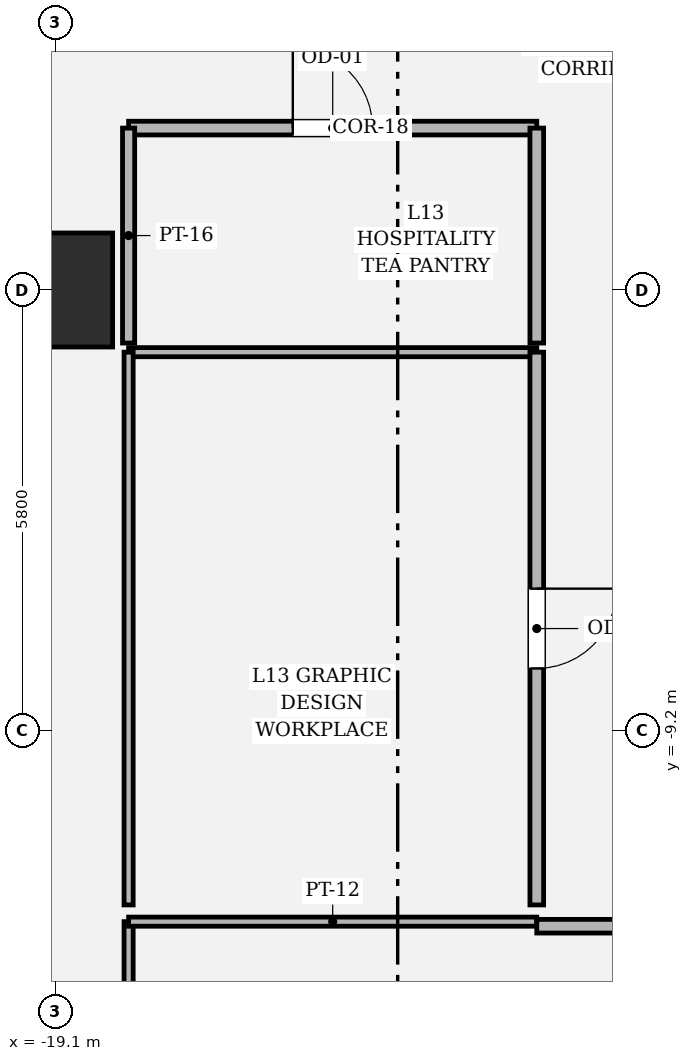
"""IFC4 building model, lengths in metres.
Left out: names, types, materials, properties, quantities, classifications, styles, units other than length and angle.
Written with IfcOpenShell. Run it as: python <this file> out.ifc"""

import sys

from ifc_helpers import new_model, si_unit, direction, frame, frame_2d, origin, origin_2d, place, context, subcontext, project, spatial, rectangle, hollow_rectangle, extrude, element, fill, save


model = new_model("IFC4")
c1 = context("Model", 3, precision=1e-05, world=origin(), true_north=direction((0.0, 1.0)))
c2 = subcontext(c1, "Body", "Model", "MODEL_VIEW")
j1 = project(units=[si_unit("LENGTHUNIT", "METRE"), si_unit("PLANEANGLEUNIT", "RADIAN")], contexts=[c1])
p1 = place(None, origin())
s1 = spatial("IfcSite", under=j1, at=p1, CompositionType="ELEMENT")
p2 = place(p1, origin())
s2 = spatial("IfcBuilding", under=s1, at=p2, CompositionType="ELEMENT")
p3 = place(p2, frame((0.0, 0.0, 60.6)))
s3 = spatial("IfcBuildingStorey", under=s2, at=p3, CompositionType="ELEMENT", Elevation=60.6)
p4 = place(p3, frame((-19.1, -3.4, 0.0), z_axis=(0.0, 0.0, 1.0), x_axis=(1.0, 0.0, 0.0)))
e1 = element("IfcColumn", 1, at=p4, inside=s3, PredefinedType="COLUMN", context=c2, shape_type="SweptSolid", body=[
    extrude(hollow_rectangle(XDim=1.5, YDim=1.5, WallThickness=0.045, at=origin_2d()), origin(), (0.0, 0.0, 1.0), 4.05),
])
p5 = place(p3, frame((-18.14, -22.44, 0.0), z_axis=(0.0, 0.0, 1.0), x_axis=(0.0, 1.0, 0.0)))
e2 = element("IfcWall", 2, at=p5, inside=s3, PredefinedType="PARTITIONING", context=c2, shape_type="SweptSolid", body=[
    extrude(rectangle(XDim=10.73, YDim=0.12, at=frame_2d((5.365, 0.0))), origin(), (0.0, 0.0, 1.0), 3.104),
])
p6 = place(p3, frame((-18.14, -11.71, 0.0), z_axis=(0.0, 0.0, 1.0), x_axis=(1.0, 0.0, 0.0)))
e3 = element("IfcWall", 3, at=p6, inside=s3, PredefinedType="PARTITIONING", context=c2, shape_type="SweptSolid", body=[
    extrude(rectangle(XDim=5.37, YDim=0.12, at=frame_2d((2.685, 0.0))), origin(), (0.0, 0.0, 1.0), 3.354),
])
p7 = place(p3, frame((-12.77, -11.77, 0.0), z_axis=(0.0, 0.0, 1.0), x_axis=(1.0, 0.0, 0.0)))
e4 = element("IfcWall", 4, at=p7, inside=s3, PredefinedType="PARTITIONING", context=c2, shape_type="SweptSolid", body=[
    extrude(rectangle(XDim=15.11, YDim=0.18, at=frame_2d((7.555, 0.0))), origin(), (0.0, 0.0, 1.0), 3.104),
])
p8 = place(p7, frame((7.03, 0.0, 0.0)))
e5 = element("IfcOpeningElement", 5, at=p8, cuts=e4, PredefinedType="OPENING", context=c2, shape_type="SweptSolid", body=[
    extrude(rectangle(XDim=1.05, YDim=2.2, at=frame_2d((0.525, 1.1))), frame((0.0, 0.1, 0.0), z_axis=(0.0, -1.0, 0.0), x_axis=(1.0, 0.0, 0.0)), (0.0, 0.0, 1.0), 0.2),
])
p9 = place(p3, frame((-18.14, -4.218, 0.0), z_axis=(0.0, 0.0, 1.0), x_axis=(1.0, 0.0, 0.0)))
e6 = element("IfcWall", 6, at=p9, inside=s3, PredefinedType="PARTITIONING", context=c2, shape_type="SweptSolid", body=[
    extrude(rectangle(XDim=5.37, YDim=0.12, at=frame_2d((2.685, 0.0))), origin(), (0.0, 0.0, 1.0), 3.81),
])
p10 = place(p3, frame((-12.77, -4.218, 0.0), z_axis=(0.0, 0.0, 1.0), x_axis=(0.0, -1.0, 0.0)))
e7 = element("IfcWall", 7, at=p10, inside=s3, PredefinedType="PARTITIONING", context=c2, shape_type="SweptSolid", body=[
    extrude(rectangle(XDim=7.272, YDim=0.18, at=frame_2d((3.636, 0.0))), origin(), (0.0, 0.0, 1.0), 3.104),
])
p11 = place(p10, frame((3.111, 0.0, 0.0)))
e8 = element("IfcOpeningElement", 8, at=p11, cuts=e7, PredefinedType="OPENING", context=c2, shape_type="SweptSolid", body=[
    extrude(rectangle(XDim=1.05, YDim=2.2, at=frame_2d((0.525, 1.1))), frame((0.0, 0.1, 0.0), z_axis=(0.0, -1.0, 0.0), x_axis=(1.0, 0.0, 0.0)), (0.0, 0.0, 1.0), 0.2),
])
p12 = place(p3, frame((-18.14, -11.49, 0.0), z_axis=(0.0, 0.0, 1.0), x_axis=(0.0, 1.0, 0.0)))
e9 = element("IfcWall", 9, at=p12, inside=s3, PredefinedType="PARTITIONING", context=c2, shape_type="SweptSolid", body=[
    extrude(rectangle(XDim=7.272, YDim=0.12, at=frame_2d((3.636, 0.0))), origin(), (0.0, 0.0, 1.0), 3.104),
])
p13 = place(p3, frame((-18.14, -1.27, 0.0), z_axis=(0.0, 0.0, 1.0), x_axis=(1.0, 0.0, 0.0)))
e10 = element("IfcWall", 10, at=p13, inside=s3, PredefinedType="PARTITIONING", context=c2, shape_type="SweptSolid", body=[
    extrude(rectangle(XDim=5.37, YDim=0.18, at=frame_2d((2.685, 0.0))), origin(), (0.0, 0.0, 1.0), 3.81),
])
p14 = place(p13, frame((2.16, 0.0, 0.0)))
e11 = element("IfcOpeningElement", 11, at=p14, cuts=e10, PredefinedType="OPENING", context=c2, shape_type="SweptSolid", body=[
    extrude(rectangle(XDim=1.05, YDim=2.2, at=frame_2d((0.525, 1.1))), frame((0.0, 0.1, 0.0), z_axis=(0.0, -1.0, 0.0), x_axis=(1.0, 0.0, 0.0)), (0.0, 0.0, 1.0), 0.2),
])
p15 = place(p3, frame((-12.77, -1.27, 0.0), z_axis=(0.0, 0.0, 1.0), x_axis=(0.0, -1.0, 0.0)))
e12 = element("IfcWall", 12, at=p15, inside=s3, PredefinedType="PARTITIONING", context=c2, shape_type="SweptSolid", body=[
    extrude(rectangle(XDim=2.828, YDim=0.18, at=frame_2d((1.414, 0.0))), origin(), (0.0, 0.0, 1.0), 3.104),
])
p16 = place(p3, frame((-18.14, -4.098, 0.0), z_axis=(0.0, 0.0, 1.0), x_axis=(0.0, 1.0, 0.0)))
e13 = element("IfcWall", 13, at=p16, inside=s3, PredefinedType="PARTITIONING", context=c2, shape_type="SweptSolid", body=[
    extrude(rectangle(XDim=2.828, YDim=0.16, at=frame_2d((1.414, 0.0))), origin(), (0.0, 0.0, 1.0), 3.104),
])
p17 = place(p11, origin())
e14 = element("IfcDoor", 14, at=p17, inside=s3, OperationType="SINGLE_SWING_LEFT", PredefinedType="DOOR", context=c2, shape_type="SweptSolid", body=[
    extrude(rectangle(XDim=1.05, YDim=2.2, at=frame_2d((0.525, 1.1))), frame((0.0, 0.025, 0.0), z_axis=(0.0, -1.0, 0.0), x_axis=(1.0, 0.0, 0.0)), (0.0, 0.0, 1.0), 0.05),
])
fill(e8, e14)
p18 = place(p14, origin())
e15 = element("IfcDoor", 15, at=p18, inside=s3, OperationType="SINGLE_SWING_LEFT", PredefinedType="DOOR", context=c2, shape_type="SweptSolid", body=[
    extrude(rectangle(XDim=1.05, YDim=2.2, at=frame_2d((0.525, 1.1))), frame((0.0, 0.025, 0.0), z_axis=(0.0, -1.0, 0.0), x_axis=(1.0, 0.0, 0.0)), (0.0, 0.0, 1.0), 0.05),
])
fill(e11, e15)
save(model, sys.argv[1])
